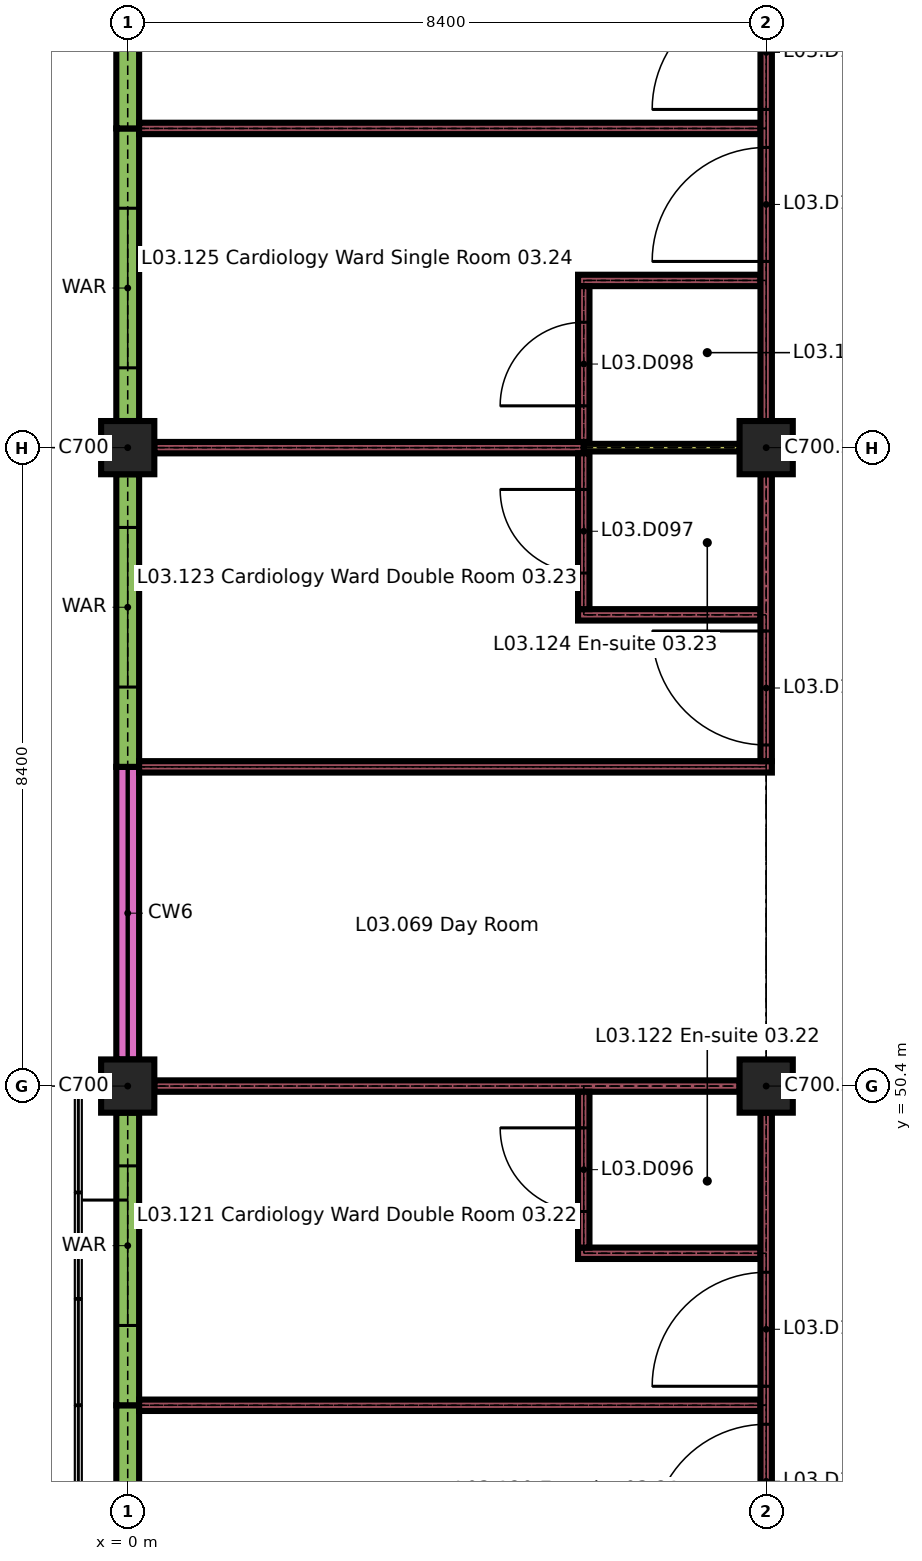
"""IFC4 building model, lengths in metres.
Left out: names, types, materials, properties, quantities, classifications, styles, units other than length and angle.
Written with IfcOpenShell. Run it as: python <this file> out.ifc"""

import sys

from ifc_helpers import new_model, si_unit, direction, frame, frame_2d, origin, origin_2d, place, context, subcontext, project, spatial, rectangle, extrude, element, fill, save


model = new_model("IFC4")
c1 = context("Model", 3, precision=1e-05, world=origin(), true_north=direction((0.0, 1.0)))
c2 = subcontext(c1, "Body", "Model", "MODEL_VIEW")
j1 = project(units=[si_unit("LENGTHUNIT", "METRE"), si_unit("PLANEANGLEUNIT", "RADIAN")], contexts=[c1])
p1 = place(None, origin())
s1 = spatial("IfcSite", under=j1, at=p1, CompositionType="ELEMENT")
p2 = place(p1, origin())
s2 = spatial("IfcBuilding", under=s1, at=p2, CompositionType="ELEMENT")
p3 = place(p2, frame((0.0, 0.0, 15.3)))
s3 = spatial("IfcBuildingStorey", under=s2, at=p3, CompositionType="ELEMENT", Elevation=15.3)
for number, where, z_axis, x_axis in (
    (1, (0.0, 50.4, 0.0), (0.0, 0.0, 1.0), (1.0, 0.0, 0.0)),
    (2, (8.4, 50.4, 0.0), (0.0, 0.0, 1.0), (1.0, 0.0, 0.0)),
    (3, (0.0, 58.8, 0.0), (0.0, 0.0, 1.0), (1.0, 0.0, 0.0)),
    (4, (8.4, 58.8, 0.0), (0.0, 0.0, 1.0), (1.0, 0.0, 0.0)),
):
    element("IfcColumn", number, at=place(p3, frame(where, z_axis=z_axis, x_axis=x_axis)), inside=s3, PredefinedType="COLUMN", context=c2, shape_type="SweptSolid", body=[
        extrude(rectangle(XDim=0.7, YDim=0.7, at=origin_2d()), origin(), (0.0, 0.0, 1.0), 3.26),
    ])
p4 = place(p3, frame((0.0, 42.35, 0.0), z_axis=(0.0, 0.0, 1.0), x_axis=(0.0, 1.0, 0.0)))
e5 = element("IfcWall", 5, at=p4, inside=s3, PredefinedType="SOLIDWALL", context=c2, shape_type="SweptSolid", body=[
    extrude(rectangle(XDim=3.85, YDim=0.3, at=frame_2d((1.925, 0.0))), origin(), (0.0, 0.0, 1.0), 2.96),
])
p5 = place(p4, frame((0.7, 0.0, 0.9)))
e6 = element("IfcOpeningElement", 6, at=p5, cuts=e5, PredefinedType="OPENING", context=c2, shape_type="SweptSolid", body=[
    extrude(rectangle(XDim=2.1, YDim=1.5, at=frame_2d((1.05, 0.75))), frame((0.0, 0.16, 0.0), z_axis=(0.0, -1.0, 0.0), x_axis=(1.0, 0.0, 0.0)), (0.0, 0.0, 1.0), 0.32),
])
p6 = place(p3, frame((0.0, 46.2, 0.0), z_axis=(0.0, 0.0, 1.0), x_axis=(0.0, 1.0, 0.0)))
e7 = element("IfcWall", 7, at=p6, inside=s3, PredefinedType="SOLIDWALL", context=c2, shape_type="SweptSolid", body=[
    extrude(rectangle(XDim=3.85, YDim=0.3, at=frame_2d((1.925, 0.0))), origin(), (0.0, 0.0, 1.0), 2.96),
])
p7 = place(p6, frame((1.05, 0.0, 0.9)))
e8 = element("IfcOpeningElement", 8, at=p7, cuts=e7, PredefinedType="OPENING", context=c2, shape_type="SweptSolid", body=[
    extrude(rectangle(XDim=2.1, YDim=1.5, at=frame_2d((1.05, 0.75))), frame((0.0, 0.16, 0.0), z_axis=(0.0, -1.0, 0.0), x_axis=(1.0, 0.0, 0.0)), (0.0, 0.0, 1.0), 0.32),
])
p8 = place(p3, frame((0.0, 50.75, 0.0), z_axis=(0.0, 0.0, 1.0), x_axis=(0.0, 1.0, 0.0)))
e9 = element("IfcWall", 9, at=p8, inside=s3, PredefinedType="SOLIDWALL", context=c2, shape_type="SweptSolid", body=[
    extrude(rectangle(XDim=3.85, YDim=0.3, at=frame_2d((1.925, 0.0))), origin(), (0.0, 0.0, 1.0), 0.6),
])
p9 = place(p3, frame((0.0, 54.6, 0.0), z_axis=(0.0, 0.0, 1.0), x_axis=(0.0, 1.0, 0.0)))
e10 = element("IfcWall", 10, at=p9, inside=s3, PredefinedType="SOLIDWALL", context=c2, shape_type="SweptSolid", body=[
    extrude(rectangle(XDim=3.85, YDim=0.3, at=frame_2d((1.925, 0.0))), origin(), (0.0, 0.0, 1.0), 2.96),
])
p10 = place(p9, frame((1.05, 0.0, 0.9)))
e11 = element("IfcOpeningElement", 11, at=p10, cuts=e10, PredefinedType="OPENING", context=c2, shape_type="SweptSolid", body=[
    extrude(rectangle(XDim=2.1, YDim=1.5, at=frame_2d((1.05, 0.75))), frame((0.0, 0.16, 0.0), z_axis=(0.0, -1.0, 0.0), x_axis=(1.0, 0.0, 0.0)), (0.0, 0.0, 1.0), 0.32),
])
p11 = place(p3, frame((0.0, 59.15, 0.0), z_axis=(0.0, 0.0, 1.0), x_axis=(0.0, 1.0, 0.0)))
e12 = element("IfcWall", 12, at=p11, inside=s3, PredefinedType="SOLIDWALL", context=c2, shape_type="SweptSolid", body=[
    extrude(rectangle(XDim=3.85, YDim=0.3, at=frame_2d((1.925, 0.0))), origin(), (0.0, 0.0, 1.0), 2.96),
])
p12 = place(p11, frame((0.7, 0.0, 0.9)))
e13 = element("IfcOpeningElement", 13, at=p12, cuts=e12, PredefinedType="OPENING", context=c2, shape_type="SweptSolid", body=[
    extrude(rectangle(XDim=2.1, YDim=1.5, at=frame_2d((1.05, 0.75))), frame((0.0, 0.16, 0.0), z_axis=(0.0, -1.0, 0.0), x_axis=(1.0, 0.0, 0.0)), (0.0, 0.0, 1.0), 0.32),
])
p13 = place(p3, frame((0.0, 63.0, 0.0), z_axis=(0.0, 0.0, 1.0), x_axis=(0.0, 1.0, 0.0)))
e14 = element("IfcWall", 14, at=p13, inside=s3, PredefinedType="SOLIDWALL", context=c2, shape_type="SweptSolid", body=[
    extrude(rectangle(XDim=4.2, YDim=0.3, at=frame_2d((2.1, 0.0))), origin(), (0.0, 0.0, 1.0), 2.96),
])
p14 = place(p13, frame((1.05, 0.0, 0.9)))
e15 = element("IfcOpeningElement", 15, at=p14, cuts=e14, PredefinedType="OPENING", context=c2, shape_type="SweptSolid", body=[
    extrude(rectangle(XDim=2.1, YDim=1.5, at=frame_2d((1.05, 0.75))), frame((0.0, 0.16, 0.0), z_axis=(0.0, -1.0, 0.0), x_axis=(1.0, 0.0, 0.0)), (0.0, 0.0, 1.0), 0.32),
])
p15 = place(p3, frame((0.15, 46.2, 0.0), z_axis=(0.0, 0.0, 1.0), x_axis=(1.0, 0.0, 0.0)))
e16 = element("IfcWall", 16, at=p15, inside=s3, PredefinedType="PARTITIONING", context=c2, shape_type="SweptSolid", body=[
    extrude(rectangle(XDim=8.175, YDim=0.15, at=frame_2d((4.087, 0.0))), origin(), (0.0, 0.0, 1.0), 3.26),
])
p16 = place(p3, frame((5.925, 48.2, 0.0), z_axis=(0.0, 0.0, 1.0), x_axis=(1.0, 0.0, 0.0)))
e17 = element("IfcWall", 17, at=p16, inside=s3, PredefinedType="PARTITIONING", context=c2, shape_type="SweptSolid", body=[
    extrude(rectangle(XDim=2.4, YDim=0.15, at=frame_2d((1.2, 0.0))), origin(), (0.0, 0.0, 1.0), 3.26),
])
p17 = place(p3, frame((0.35, 50.4, 0.0), z_axis=(0.0, 0.0, 1.0), x_axis=(1.0, 0.0, 0.0)))
e18 = element("IfcWall", 18, at=p17, inside=s3, PredefinedType="PARTITIONING", context=c2, shape_type="SweptSolid", body=[
    extrude(rectangle(XDim=7.7, YDim=0.15, at=frame_2d((3.85, 0.0))), origin(), (0.0, 0.0, 1.0), 3.26),
])
p18 = place(p3, frame((0.15, 54.6, 0.0), z_axis=(0.0, 0.0, 1.0), x_axis=(1.0, 0.0, 0.0)))
e19 = element("IfcWall", 19, at=p18, inside=s3, PredefinedType="PARTITIONING", context=c2, shape_type="SweptSolid", body=[
    extrude(rectangle(XDim=8.325, YDim=0.15, at=frame_2d((4.163, 0.0))), origin(), (0.0, 0.0, 1.0), 3.26),
])
p19 = place(p3, frame((5.925, 56.6, 0.0), z_axis=(0.0, 0.0, 1.0), x_axis=(1.0, 0.0, 0.0)))
e20 = element("IfcWall", 20, at=p19, inside=s3, PredefinedType="PARTITIONING", context=c2, shape_type="SweptSolid", body=[
    extrude(rectangle(XDim=2.4, YDim=0.15, at=frame_2d((1.2, 0.0))), origin(), (0.0, 0.0, 1.0), 3.26),
])
p20 = place(p3, frame((0.35, 58.8, 0.0), z_axis=(0.0, 0.0, 1.0), x_axis=(1.0, 0.0, 0.0)))
e21 = element("IfcWall", 21, at=p20, inside=s3, PredefinedType="PARTITIONING", context=c2, shape_type="SweptSolid", body=[
    extrude(rectangle(XDim=5.65, YDim=0.15, at=frame_2d((2.825, 0.0))), origin(), (0.0, 0.0, 1.0), 3.26),
])
p21 = place(p3, frame((6.0, 58.8, 0.0), z_axis=(0.0, 0.0, 1.0), x_axis=(1.0, 0.0, 0.0)))
e22 = element("IfcWall", 22, at=p21, inside=s3, PredefinedType="PARTITIONING", context=c2, shape_type="SweptSolid", body=[
    extrude(rectangle(XDim=2.05, YDim=0.1, at=frame_2d((1.025, 0.0))), origin(), (0.0, 0.0, 1.0), 3.26),
])
p22 = place(p3, frame((5.925, 61.0, 0.0), z_axis=(0.0, 0.0, 1.0), x_axis=(1.0, 0.0, 0.0)))
e23 = element("IfcWall", 23, at=p22, inside=s3, PredefinedType="PARTITIONING", context=c2, shape_type="SweptSolid", body=[
    extrude(rectangle(XDim=2.4, YDim=0.15, at=frame_2d((1.2, 0.0))), origin(), (0.0, 0.0, 1.0), 3.26),
])
p23 = place(p3, frame((0.15, 63.0, 0.0), z_axis=(0.0, 0.0, 1.0), x_axis=(1.0, 0.0, 0.0)))
e24 = element("IfcWall", 24, at=p23, inside=s3, PredefinedType="PARTITIONING", context=c2, shape_type="SweptSolid", body=[
    extrude(rectangle(XDim=8.175, YDim=0.15, at=frame_2d((4.087, 0.0))), origin(), (0.0, 0.0, 1.0), 3.26),
])
p24 = place(p3, frame((6.0, 48.275, 0.0), z_axis=(0.0, 0.0, 1.0), x_axis=(0.0, 1.0, 0.0)))
e25 = element("IfcWall", 25, at=p24, inside=s3, PredefinedType="PARTITIONING", context=c2, shape_type="SweptSolid", body=[
    extrude(rectangle(XDim=2.05, YDim=0.15, at=frame_2d((1.025, 0.0))), origin(), (0.0, 0.0, 1.0), 3.26),
])
p25 = place(p24, frame((0.475, 0.0, 0.0)))
e26 = element("IfcOpeningElement", 26, at=p25, cuts=e25, PredefinedType="OPENING", context=c2, shape_type="SweptSolid", body=[
    extrude(rectangle(XDim=1.1, YDim=2.1, at=frame_2d((0.55, 1.05))), frame((0.0, 0.085, 0.0), z_axis=(0.0, -1.0, 0.0), x_axis=(1.0, 0.0, 0.0)), (0.0, 0.0, 1.0), 0.17),
])
p26 = place(p3, frame((6.0, 56.675, 0.0), z_axis=(0.0, 0.0, 1.0), x_axis=(0.0, 1.0, 0.0)))
e27 = element("IfcWall", 27, at=p26, inside=s3, PredefinedType="PARTITIONING", context=c2, shape_type="SweptSolid", body=[
    extrude(rectangle(XDim=2.05, YDim=0.15, at=frame_2d((1.025, 0.0))), origin(), (0.0, 0.0, 1.0), 3.26),
])
p27 = place(p26, frame((0.475, 0.0, 0.0)))
e28 = element("IfcOpeningElement", 28, at=p27, cuts=e27, PredefinedType="OPENING", context=c2, shape_type="SweptSolid", body=[
    extrude(rectangle(XDim=1.1, YDim=2.1, at=frame_2d((0.55, 1.05))), frame((0.0, 0.085, 0.0), z_axis=(0.0, -1.0, 0.0), x_axis=(1.0, 0.0, 0.0)), (0.0, 0.0, 1.0), 0.17),
])
p28 = place(p3, frame((6.0, 58.875, 0.0), z_axis=(0.0, 0.0, 1.0), x_axis=(0.0, 1.0, 0.0)))
e29 = element("IfcWall", 29, at=p28, inside=s3, PredefinedType="PARTITIONING", context=c2, shape_type="SweptSolid", body=[
    extrude(rectangle(XDim=2.05, YDim=0.15, at=frame_2d((1.025, 0.0))), origin(), (0.0, 0.0, 1.0), 3.26),
])
p29 = place(p28, frame((0.475, 0.0, 0.0)))
e30 = element("IfcOpeningElement", 30, at=p29, cuts=e29, PredefinedType="OPENING", context=c2, shape_type="SweptSolid", body=[
    extrude(rectangle(XDim=1.1, YDim=2.1, at=frame_2d((0.55, 1.05))), frame((0.0, 0.085, 0.0), z_axis=(0.0, -1.0, 0.0), x_axis=(1.0, 0.0, 0.0)), (0.0, 0.0, 1.0), 0.17),
])
p30 = place(p3, frame((8.4, 42.35, 0.0), z_axis=(0.0, 0.0, 1.0), x_axis=(0.0, 1.0, 0.0)))
e31 = element("IfcWall", 31, at=p30, inside=s3, PredefinedType="PARTITIONING", context=c2, shape_type="SweptSolid", body=[
    extrude(rectangle(XDim=7.7, YDim=0.15, at=frame_2d((3.85, 0.0))), origin(), (0.0, 0.0, 1.0), 3.26),
])
p31 = place(p30, frame((2.1, 0.0, 0.0)))
e32 = element("IfcOpeningElement", 32, at=p31, cuts=e31, PredefinedType="OPENING", context=c2, shape_type="SweptSolid", body=[
    extrude(rectangle(XDim=1.5, YDim=2.4, at=frame_2d((0.75, 1.2))), frame((0.0, 0.085, 0.0), z_axis=(0.0, -1.0, 0.0), x_axis=(1.0, 0.0, 0.0)), (0.0, 0.0, 1.0), 0.17),
])
p32 = place(p30, frame((4.1, 0.0, 0.0)))
e33 = element("IfcOpeningElement", 33, at=p32, cuts=e31, PredefinedType="OPENING", context=c2, shape_type="SweptSolid", body=[
    extrude(rectangle(XDim=1.5, YDim=2.4, at=frame_2d((0.75, 1.2))), frame((0.0, 0.085, 0.0), z_axis=(0.0, -1.0, 0.0), x_axis=(1.0, 0.0, 0.0)), (0.0, 0.0, 1.0), 0.17),
])
p33 = place(p3, frame((8.4, 54.675, 0.0), z_axis=(0.0, 0.0, 1.0), x_axis=(0.0, 1.0, 0.0)))
e34 = element("IfcWall", 34, at=p33, inside=s3, PredefinedType="PARTITIONING", context=c2, shape_type="SweptSolid", body=[
    extrude(rectangle(XDim=3.775, YDim=0.15, at=frame_2d((1.887, 0.0))), origin(), (0.0, 0.0, 1.0), 3.26),
])
p34 = place(p33, frame((0.212, 0.0, 0.0)))
e35 = element("IfcOpeningElement", 35, at=p34, cuts=e34, PredefinedType="OPENING", context=c2, shape_type="SweptSolid", body=[
    extrude(rectangle(XDim=1.5, YDim=2.4, at=frame_2d((0.75, 1.2))), frame((0.0, 0.085, 0.0), z_axis=(0.0, -1.0, 0.0), x_axis=(1.0, 0.0, 0.0)), (0.0, 0.0, 1.0), 0.17),
])
p35 = place(p3, frame((8.4, 59.15, 0.0), z_axis=(0.0, 0.0, 1.0), x_axis=(0.0, 1.0, 0.0)))
e36 = element("IfcWall", 36, at=p35, inside=s3, PredefinedType="PARTITIONING", context=c2, shape_type="SweptSolid", body=[
    extrude(rectangle(XDim=8.05, YDim=0.15, at=frame_2d((4.025, 0.0))), origin(), (0.0, 0.0, 1.0), 3.26),
])
p36 = place(p35, frame((2.1, 0.0, 0.0)))
e37 = element("IfcOpeningElement", 37, at=p36, cuts=e36, PredefinedType="OPENING", context=c2, shape_type="SweptSolid", body=[
    extrude(rectangle(XDim=1.5, YDim=2.4, at=frame_2d((0.75, 1.2))), frame((0.0, 0.085, 0.0), z_axis=(0.0, -1.0, 0.0), x_axis=(1.0, 0.0, 0.0)), (0.0, 0.0, 1.0), 0.17),
])
p37 = place(p35, frame((4.1, 0.0, 0.0)))
e38 = element("IfcOpeningElement", 38, at=p37, cuts=e36, PredefinedType="OPENING", context=c2, shape_type="SweptSolid", body=[
    extrude(rectangle(XDim=1.5, YDim=2.4, at=frame_2d((0.75, 1.2))), frame((0.0, 0.085, 0.0), z_axis=(0.0, -1.0, 0.0), x_axis=(1.0, 0.0, 0.0)), (0.0, 0.0, 1.0), 0.17),
])
p38 = place(p7, origin())
e39 = element("IfcWindow", 39, at=p38, inside=s3, PartitioningType="DOUBLE_PANEL_VERTICAL", PredefinedType="WINDOW", context=c2, shape_type="SweptSolid", body=[
    extrude(rectangle(XDim=2.1, YDim=1.5, at=frame_2d((1.05, 0.75))), frame((0.0, 0.05, 0.0), z_axis=(0.0, -1.0, 0.0), x_axis=(1.0, 0.0, 0.0)), (0.0, 0.0, 1.0), 0.1),
])
fill(e8, e39)
p39 = place(p10, origin())
e40 = element("IfcWindow", 40, at=p39, inside=s3, PartitioningType="DOUBLE_PANEL_VERTICAL", PredefinedType="WINDOW", context=c2, shape_type="SweptSolid", body=[
    extrude(rectangle(XDim=2.1, YDim=1.5, at=frame_2d((1.05, 0.75))), frame((0.0, 0.05, 0.0), z_axis=(0.0, -1.0, 0.0), x_axis=(1.0, 0.0, 0.0)), (0.0, 0.0, 1.0), 0.1),
])
fill(e11, e40)
p40 = place(p12, origin())
e41 = element("IfcWindow", 41, at=p40, inside=s3, PartitioningType="DOUBLE_PANEL_VERTICAL", PredefinedType="WINDOW", context=c2, shape_type="SweptSolid", body=[
    extrude(rectangle(XDim=2.1, YDim=1.5, at=frame_2d((1.05, 0.75))), frame((0.0, 0.05, 0.0), z_axis=(0.0, -1.0, 0.0), x_axis=(1.0, 0.0, 0.0)), (0.0, 0.0, 1.0), 0.1),
])
fill(e13, e41)
p41 = place(p25, origin())
e42 = element("IfcDoor", 42, at=p41, inside=s3, OperationType="SINGLE_SWING_LEFT", PredefinedType="DOOR", context=c2, shape_type="SweptSolid", body=[
    extrude(rectangle(XDim=1.1, YDim=2.1, at=frame_2d((0.55, 1.05))), frame((0.0, 0.025, 0.0), z_axis=(0.0, -1.0, 0.0), x_axis=(1.0, 0.0, 0.0)), (0.0, 0.0, 1.0), 0.05),
])
fill(e26, e42)
p42 = place(p27, origin())
e43 = element("IfcDoor", 43, at=p42, inside=s3, OperationType="SINGLE_SWING_LEFT", PredefinedType="DOOR", context=c2, shape_type="SweptSolid", body=[
    extrude(rectangle(XDim=1.1, YDim=2.1, at=frame_2d((0.55, 1.05))), frame((0.0, 0.025, 0.0), z_axis=(0.0, -1.0, 0.0), x_axis=(1.0, 0.0, 0.0)), (0.0, 0.0, 1.0), 0.05),
])
fill(e28, e43)
p43 = place(p29, origin())
e44 = element("IfcDoor", 44, at=p43, inside=s3, OperationType="SINGLE_SWING_RIGHT", PredefinedType="DOOR", context=c2, shape_type="SweptSolid", body=[
    extrude(rectangle(XDim=1.1, YDim=2.1, at=frame_2d((0.55, 1.05))), frame((0.0, 0.025, 0.0), z_axis=(0.0, -1.0, 0.0), x_axis=(1.0, 0.0, 0.0)), (0.0, 0.0, 1.0), 0.05),
])
fill(e30, e44)
p44 = place(p31, origin())
e45 = element("IfcDoor", 45, at=p44, inside=s3, OperationType="SINGLE_SWING_RIGHT", PredefinedType="DOOR", context=c2, shape_type="SweptSolid", body=[
    extrude(rectangle(XDim=1.5, YDim=2.4, at=frame_2d((0.75, 1.2))), frame((0.0, 0.03, 0.0), z_axis=(0.0, -1.0, 0.0), x_axis=(1.0, 0.0, 0.0)), (0.0, 0.0, 1.0), 0.06),
])
fill(e32, e45)
p45 = place(p32, origin())
e46 = element("IfcDoor", 46, at=p45, inside=s3, OperationType="SINGLE_SWING_RIGHT", PredefinedType="DOOR", context=c2, shape_type="SweptSolid", body=[
    extrude(rectangle(XDim=1.5, YDim=2.4, at=frame_2d((0.75, 1.2))), frame((0.0, 0.03, 0.0), z_axis=(0.0, -1.0, 0.0), x_axis=(1.0, 0.0, 0.0)), (0.0, 0.0, 1.0), 0.06),
])
fill(e33, e46)
p46 = place(p34, origin())
e47 = element("IfcDoor", 47, at=p46, inside=s3, OperationType="SINGLE_SWING_LEFT", PredefinedType="DOOR", context=c2, shape_type="SweptSolid", body=[
    extrude(rectangle(XDim=1.5, YDim=2.4, at=frame_2d((0.75, 1.2))), frame((0.0, 0.03, 0.0), z_axis=(0.0, -1.0, 0.0), x_axis=(1.0, 0.0, 0.0)), (0.0, 0.0, 1.0), 0.06),
])
fill(e35, e47)
p47 = place(p36, origin())
e48 = element("IfcDoor", 48, at=p47, inside=s3, OperationType="SINGLE_SWING_RIGHT", PredefinedType="DOOR", context=c2, shape_type="SweptSolid", body=[
    extrude(rectangle(XDim=1.5, YDim=2.4, at=frame_2d((0.75, 1.2))), frame((0.0, 0.03, 0.0), z_axis=(0.0, -1.0, 0.0), x_axis=(1.0, 0.0, 0.0)), (0.0, 0.0, 1.0), 0.06),
])
fill(e37, e48)
p48 = place(p37, origin())
e49 = element("IfcDoor", 49, at=p48, inside=s3, OperationType="SINGLE_SWING_RIGHT", PredefinedType="DOOR", context=c2, shape_type="SweptSolid", body=[
    extrude(rectangle(XDim=1.5, YDim=2.4, at=frame_2d((0.75, 1.2))), frame((0.0, 0.03, 0.0), z_axis=(0.0, -1.0, 0.0), x_axis=(1.0, 0.0, 0.0)), (0.0, 0.0, 1.0), 0.06),
])
fill(e38, e49)
save(model, sys.argv[1])
